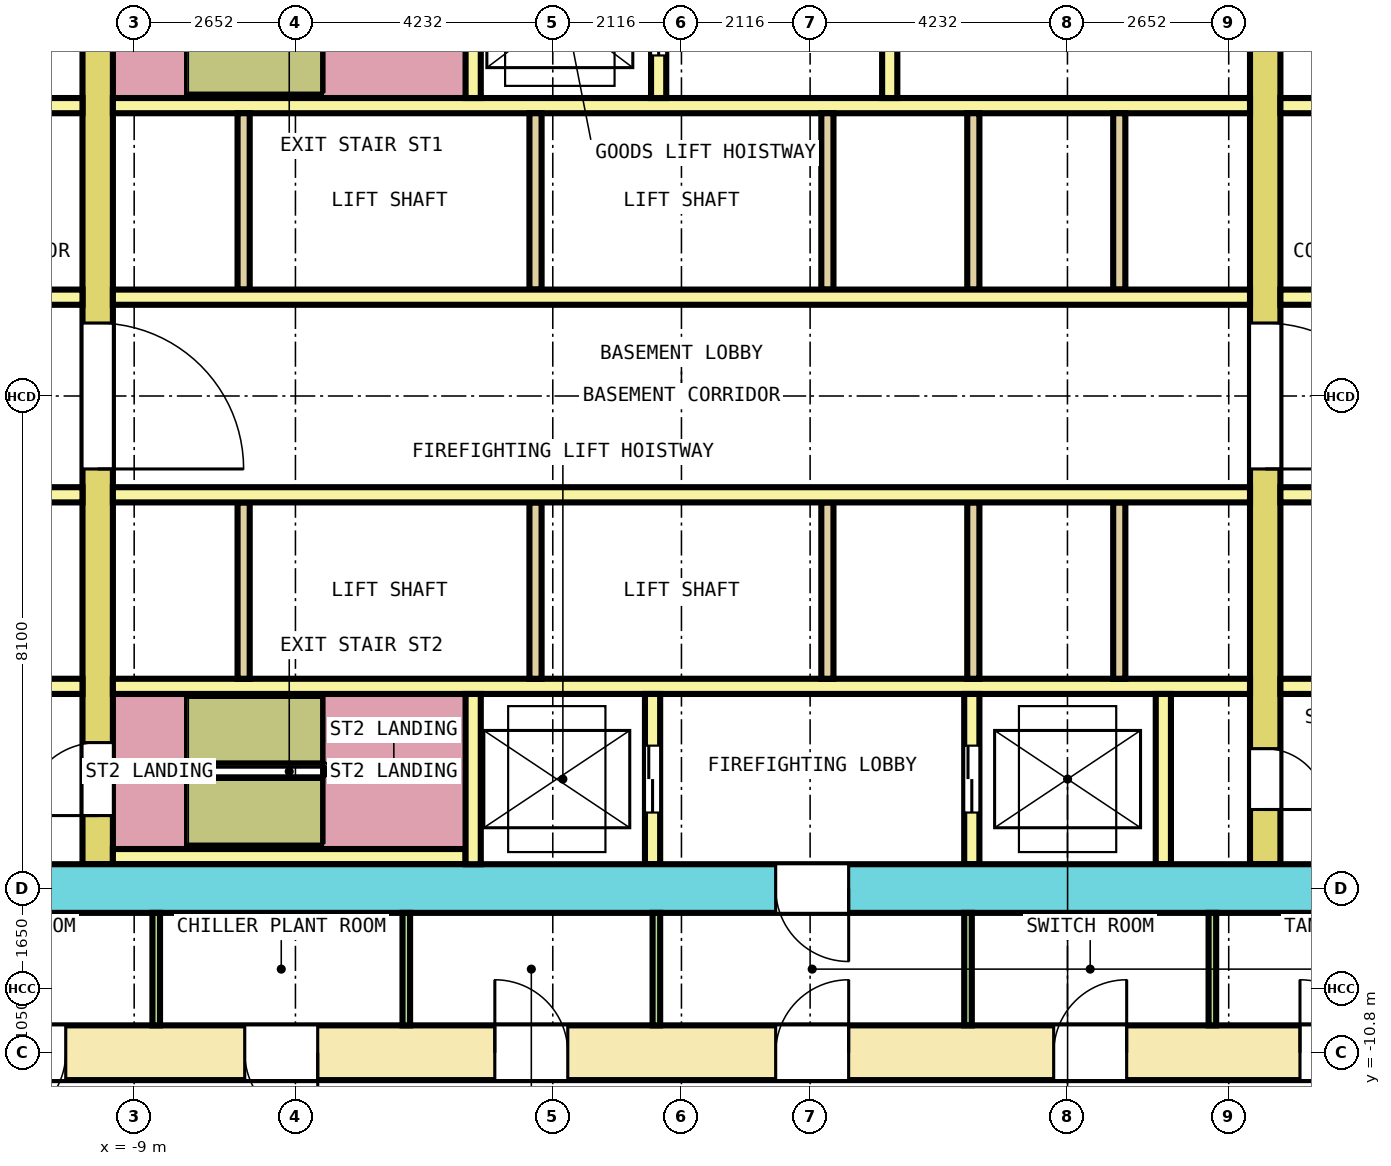
"""IFC4 building model, lengths in metres.
Left out: names, types, materials, properties, quantities, classifications, styles, units other than length and angle.
Written with IfcOpenShell. Run it as: python <this file> out.ifc"""

import sys

from ifc_helpers import new_model, si_unit, direction, frame, frame_2d, origin, place, context, subcontext, project, spatial, rectangle, extrude, element, fill, save


model = new_model("IFC4")
c1 = context("Model", 3, precision=1e-05, world=origin(), true_north=direction((0.0, 1.0)))
c2 = subcontext(c1, "Body", "Model", "MODEL_VIEW")
j1 = project(units=[si_unit("LENGTHUNIT", "METRE"), si_unit("PLANEANGLEUNIT", "RADIAN")], contexts=[c1])
p1 = place(None, origin())
s1 = spatial("IfcSite", under=j1, at=p1, CompositionType="ELEMENT")
p2 = place(p1, origin())
s2 = spatial("IfcBuilding", under=s1, at=p2, CompositionType="ELEMENT")
p3 = place(p2, frame((0.0, 0.0, -5.2)))
s3 = spatial("IfcBuildingStorey", under=s2, at=p3, CompositionType="ELEMENT", Elevation=-5.2)
p4 = place(p3, frame((-13.65, -10.8, 0.0), z_axis=(0.0, 0.0, 1.0), x_axis=(1.0, 0.0, 0.0)))
e1 = element("IfcWall", 1, at=p4, inside=s3, PredefinedType="SHEAR", context=c2, shape_type="SweptSolid", body=[
    extrude(rectangle(XDim=27.3, YDim=0.9, at=frame_2d((13.65, 0.0))), origin(), (0.0, 0.0, 1.0), 4.9),
])
p5 = place(p4, frame((2.325, 0.0, 0.0)))
e2 = element("IfcOpeningElement", 2, at=p5, cuts=e1, PredefinedType="OPENING", context=c2, shape_type="SweptSolid", body=[
    extrude(rectangle(XDim=1.2, YDim=2.1, at=frame_2d((0.6, 1.05))), frame((0.0, 0.46, 0.0), z_axis=(0.0, -1.0, 0.0), x_axis=(1.0, 0.0, 0.0)), (0.0, 0.0, 1.0), 0.92),
])
p6 = place(p4, frame((6.469, 0.0, 0.0)))
e3 = element("IfcOpeningElement", 3, at=p6, cuts=e1, PredefinedType="OPENING", context=c2, shape_type="SweptSolid", body=[
    extrude(rectangle(XDim=1.2, YDim=2.1, at=frame_2d((0.6, 1.05))), frame((0.0, 0.46, 0.0), z_axis=(0.0, -1.0, 0.0), x_axis=(1.0, 0.0, 0.0)), (0.0, 0.0, 1.0), 0.92),
])
p7 = place(p4, frame((10.581, 0.0, 0.0)))
e4 = element("IfcOpeningElement", 4, at=p7, cuts=e1, PredefinedType="OPENING", context=c2, shape_type="SweptSolid", body=[
    extrude(rectangle(XDim=1.2, YDim=2.1, at=frame_2d((0.6, 1.05))), frame((0.0, 0.46, 0.0), z_axis=(0.0, -1.0, 0.0), x_axis=(1.0, 0.0, 0.0)), (0.0, 0.0, 1.0), 0.92),
])
p8 = place(p4, frame((19.772, 0.0, 0.0)))
e5 = element("IfcOpeningElement", 5, at=p8, cuts=e1, PredefinedType="OPENING", context=c2, shape_type="SweptSolid", body=[
    extrude(rectangle(XDim=1.2, YDim=2.1, at=frame_2d((0.6, 1.05))), frame((0.0, 0.46, 0.0), z_axis=(0.0, -1.0, 0.0), x_axis=(1.0, 0.0, 0.0)), (0.0, 0.0, 1.0), 0.92),
])
p9 = place(p4, frame((23.822, 0.0, 0.0)))
e6 = element("IfcOpeningElement", 6, at=p9, cuts=e1, PredefinedType="OPENING", context=c2, shape_type="SweptSolid", body=[
    extrude(rectangle(XDim=1.2, YDim=2.1, at=frame_2d((0.6, 1.05))), frame((0.0, 0.46, 0.0), z_axis=(0.0, -1.0, 0.0), x_axis=(1.0, 0.0, 0.0)), (0.0, 0.0, 1.0), 0.92),
])
p10 = place(p4, frame((15.2, 0.0, 0.0)))
e7 = element("IfcOpeningElement", 7, at=p10, cuts=e1, PredefinedType="OPENING", context=c2, shape_type="SweptSolid", body=[
    extrude(rectangle(XDim=1.2, YDim=2.1, at=frame_2d((0.6, 1.05))), frame((0.0, 0.46, 0.0), z_axis=(0.0, -1.0, 0.0), x_axis=(1.0, 0.0, 0.0)), (0.0, 0.0, 1.0), 0.92),
])
p11 = place(p3, frame((-12.75, -8.1, 0.0), z_axis=(0.0, 0.0, 1.0), x_axis=(1.0, 0.0, 0.0)))
e8 = element("IfcWall", 8, at=p11, inside=s3, PredefinedType="SHEAR", context=c2, shape_type="SweptSolid", body=[
    extrude(rectangle(XDim=25.5, YDim=0.8, at=frame_2d((12.75, 0.0))), origin(), (0.0, 0.0, 1.0), 4.9),
])
p12 = place(p11, frame((14.3, 0.0, 0.0)))
e9 = element("IfcOpeningElement", 9, at=p12, cuts=e8, PredefinedType="OPENING", context=c2, shape_type="SweptSolid", body=[
    extrude(rectangle(XDim=1.2, YDim=2.1, at=frame_2d((0.6, 1.05))), frame((0.0, 0.41, 0.0), z_axis=(0.0, -1.0, 0.0), x_axis=(1.0, 0.0, 0.0)), (0.0, 0.0, 1.0), 0.82),
])
p13 = place(p3, frame((-9.6, -7.7, 0.0), z_axis=(0.0, 0.0, 1.0), x_axis=(0.0, 1.0, 0.0)))
e10 = element("IfcWall", 10, at=p13, inside=s3, PredefinedType="SHEAR", context=c2, shape_type="SweptSolid", body=[
    extrude(rectangle(XDim=15.4, YDim=0.5, at=frame_2d((7.7, 0.0))), origin(), (0.0, 0.0, 1.0), 4.9),
])
p14 = place(p13, frame((6.5, 0.0, 0.0)))
e11 = element("IfcOpeningElement", 11, at=p14, cuts=e10, PredefinedType="OPENING", context=c2, shape_type="SweptSolid", body=[
    extrude(rectangle(XDim=2.4, YDim=2.1, at=frame_2d((1.2, 1.05))), frame((0.0, 0.26, 0.0), z_axis=(0.0, -1.0, 0.0), x_axis=(1.0, 0.0, 0.0)), (0.0, 0.0, 1.0), 0.52),
])
p15 = place(p13, frame((13.4, 0.0, 0.0)))
e12 = element("IfcOpeningElement", 12, at=p15, cuts=e10, PredefinedType="OPENING", context=c2, shape_type="SweptSolid", body=[
    extrude(rectangle(XDim=1.2, YDim=2.1, at=frame_2d((0.6, 1.05))), frame((0.0, 0.26, 0.0), z_axis=(0.0, -1.0, 0.0), x_axis=(1.0, 0.0, 0.0)), (0.0, 0.0, 1.0), 0.52),
])
p16 = place(p13, frame((0.8, 0.0, 0.0)))
e13 = element("IfcOpeningElement", 13, at=p16, cuts=e10, PredefinedType="OPENING", context=c2, shape_type="SweptSolid", body=[
    extrude(rectangle(XDim=1.2, YDim=2.1, at=frame_2d((0.6, 1.05))), frame((0.0, 0.26, 0.0), z_axis=(0.0, -1.0, 0.0), x_axis=(1.0, 0.0, 0.0)), (0.0, 0.0, 1.0), 0.52),
])
p17 = place(p3, frame((9.6, -7.7, 0.0), z_axis=(0.0, 0.0, 1.0), x_axis=(0.0, 1.0, 0.0)))
e14 = element("IfcWall", 14, at=p17, inside=s3, PredefinedType="SHEAR", context=c2, shape_type="SweptSolid", body=[
    extrude(rectangle(XDim=15.4, YDim=0.5, at=frame_2d((7.7, 0.0))), origin(), (0.0, 0.0, 1.0), 4.9),
])
p18 = place(p17, frame((6.5, 0.0, 0.0)))
e15 = element("IfcOpeningElement", 15, at=p18, cuts=e14, PredefinedType="OPENING", context=c2, shape_type="SweptSolid", body=[
    extrude(rectangle(XDim=2.4, YDim=2.1, at=frame_2d((1.2, 1.05))), frame((0.0, 0.26, 0.0), z_axis=(0.0, -1.0, 0.0), x_axis=(1.0, 0.0, 0.0)), (0.0, 0.0, 1.0), 0.52),
])
p19 = place(p17, frame((0.9, 0.0, 0.0)))
e16 = element("IfcOpeningElement", 16, at=p19, cuts=e14, PredefinedType="OPENING", context=c2, shape_type="SweptSolid", body=[
    extrude(rectangle(XDim=1.0, YDim=2.1, at=frame_2d((0.5, 1.05))), frame((0.0, 0.26, 0.0), z_axis=(0.0, -1.0, 0.0), x_axis=(1.0, 0.0, 0.0)), (0.0, 0.0, 1.0), 0.52),
])
p20 = place(p3, frame((-12.75, 1.625, 0.0), z_axis=(0.0, 0.0, 1.0), x_axis=(1.0, 0.0, 0.0)))
e17 = element("IfcWall", 17, at=p20, inside=s3, PredefinedType="SOLIDWALL", context=c2, shape_type="SweptSolid", body=[
    extrude(rectangle(XDim=2.9, YDim=0.25, at=frame_2d((1.45, 0.0))), origin(), (0.0, 0.0, 1.0), 4.9),
])
p21 = place(p3, frame((-9.35, 1.625, 0.0), z_axis=(0.0, 0.0, 1.0), x_axis=(1.0, 0.0, 0.0)))
e18 = element("IfcWall", 18, at=p21, inside=s3, PredefinedType="SOLIDWALL", context=c2, shape_type="SweptSolid", body=[
    extrude(rectangle(XDim=18.7, YDim=0.25, at=frame_2d((9.35, 0.0))), origin(), (0.0, 0.0, 1.0), 4.9),
])
for number, where, z_axis, x_axis in (
    (19, (9.85, 1.625, 0.0), (0.0, 0.0, 1.0), (1.0, 0.0, 0.0)),
    (20, (-12.75, 4.775, 0.0), (0.0, 0.0, 1.0), (1.0, 0.0, 0.0)),
):
    element("IfcWall", number, at=place(p3, frame(where, z_axis=z_axis, x_axis=x_axis)), inside=s3, PredefinedType="SOLIDWALL", context=c2, shape_type="SweptSolid", body=[
        extrude(rectangle(XDim=2.9, YDim=0.25, at=frame_2d((1.45, 0.0))), origin(), (0.0, 0.0, 1.0), 4.9),
    ])
p22 = place(p3, frame((-9.35, 4.775, 0.0), z_axis=(0.0, 0.0, 1.0), x_axis=(1.0, 0.0, 0.0)))
e21 = element("IfcWall", 21, at=p22, inside=s3, PredefinedType="SOLIDWALL", context=c2, shape_type="SweptSolid", body=[
    extrude(rectangle(XDim=18.7, YDim=0.25, at=frame_2d((9.35, 0.0))), origin(), (0.0, 0.0, 1.0), 4.9),
])
p23 = place(p3, frame((9.85, 4.775, 0.0), z_axis=(0.0, 0.0, 1.0), x_axis=(1.0, 0.0, 0.0)))
e22 = element("IfcWall", 22, at=p23, inside=s3, PredefinedType="SOLIDWALL", context=c2, shape_type="SweptSolid", body=[
    extrude(rectangle(XDim=2.9, YDim=0.25, at=frame_2d((1.45, 0.0))), origin(), (0.0, 0.0, 1.0), 4.9),
])
for number, where, z_axis, x_axis in (
    (23, (-7.2, 1.75, 0.0), (0.0, 0.0, 1.0), (0.0, 1.0, 0.0)),
    (24, (-2.4, 1.75, 0.0), (0.0, 0.0, 1.0), (0.0, 1.0, 0.0)),
    (25, (2.4, 1.75, 0.0), (0.0, 0.0, 1.0), (0.0, 1.0, 0.0)),
    (26, (4.8, 1.75, 0.0), (0.0, 0.0, 1.0), (0.0, 1.0, 0.0)),
    (27, (7.2, 1.75, 0.0), (0.0, 0.0, 1.0), (0.0, 1.0, 0.0)),
):
    element("IfcWall", number, at=place(p3, frame(where, z_axis=z_axis, x_axis=x_axis)), inside=s3, PredefinedType="SOLIDWALL", context=c2, shape_type="SweptSolid", body=[
        extrude(rectangle(XDim=2.9, YDim=0.2, at=frame_2d((1.45, 0.0))), origin(), (0.0, 0.0, 1.0), 4.9),
    ])
p24 = place(p3, frame((-12.75, -1.625, 0.0), z_axis=(0.0, 0.0, 1.0), x_axis=(1.0, 0.0, 0.0)))
e28 = element("IfcWall", 28, at=p24, inside=s3, PredefinedType="SOLIDWALL", context=c2, shape_type="SweptSolid", body=[
    extrude(rectangle(XDim=2.9, YDim=0.25, at=frame_2d((1.45, 0.0))), origin(), (0.0, 0.0, 1.0), 4.9),
])
p25 = place(p3, frame((-9.35, -1.625, 0.0), z_axis=(0.0, 0.0, 1.0), x_axis=(1.0, 0.0, 0.0)))
e29 = element("IfcWall", 29, at=p25, inside=s3, PredefinedType="SOLIDWALL", context=c2, shape_type="SweptSolid", body=[
    extrude(rectangle(XDim=18.7, YDim=0.25, at=frame_2d((9.35, 0.0))), origin(), (0.0, 0.0, 1.0), 4.9),
])
for number, where, z_axis, x_axis in (
    (30, (9.85, -1.625, 0.0), (0.0, 0.0, 1.0), (1.0, 0.0, 0.0)),
    (31, (-12.75, -4.775, 0.0), (0.0, 0.0, 1.0), (1.0, 0.0, 0.0)),
):
    element("IfcWall", number, at=place(p3, frame(where, z_axis=z_axis, x_axis=x_axis)), inside=s3, PredefinedType="SOLIDWALL", context=c2, shape_type="SweptSolid", body=[
        extrude(rectangle(XDim=2.9, YDim=0.25, at=frame_2d((1.45, 0.0))), origin(), (0.0, 0.0, 1.0), 4.9),
    ])
p26 = place(p3, frame((-9.35, -4.775, 0.0), z_axis=(0.0, 0.0, 1.0), x_axis=(1.0, 0.0, 0.0)))
e32 = element("IfcWall", 32, at=p26, inside=s3, PredefinedType="SOLIDWALL", context=c2, shape_type="SweptSolid", body=[
    extrude(rectangle(XDim=18.7, YDim=0.25, at=frame_2d((9.35, 0.0))), origin(), (0.0, 0.0, 1.0), 4.9),
])
p27 = place(p3, frame((9.85, -4.775, 0.0), z_axis=(0.0, 0.0, 1.0), x_axis=(1.0, 0.0, 0.0)))
e33 = element("IfcWall", 33, at=p27, inside=s3, PredefinedType="SOLIDWALL", context=c2, shape_type="SweptSolid", body=[
    extrude(rectangle(XDim=2.9, YDim=0.25, at=frame_2d((1.45, 0.0))), origin(), (0.0, 0.0, 1.0), 4.9),
])
for number, where, z_axis, x_axis in (
    (34, (-7.2, -4.65, 0.0), (0.0, 0.0, 1.0), (0.0, 1.0, 0.0)),
    (35, (-2.4, -4.65, 0.0), (0.0, 0.0, 1.0), (0.0, 1.0, 0.0)),
    (36, (2.4, -4.65, 0.0), (0.0, 0.0, 1.0), (0.0, 1.0, 0.0)),
    (37, (4.8, -4.65, 0.0), (0.0, 0.0, 1.0), (0.0, 1.0, 0.0)),
    (38, (7.2, -4.65, 0.0), (0.0, 0.0, 1.0), (0.0, 1.0, 0.0)),
):
    element("IfcWall", number, at=place(p3, frame(where, z_axis=z_axis, x_axis=x_axis)), inside=s3, PredefinedType="SOLIDWALL", context=c2, shape_type="SweptSolid", body=[
        extrude(rectangle(XDim=2.9, YDim=0.2, at=frame_2d((1.45, 0.0))), origin(), (0.0, 0.0, 1.0), 4.9),
    ])
p28 = place(p3, frame((-3.425, 4.9, 0.0), z_axis=(0.0, 0.0, 1.0), x_axis=(0.0, 1.0, 0.0)))
e39 = element("IfcWall", 39, at=p28, inside=s3, PredefinedType="SOLIDWALL", context=c2, shape_type="SweptSolid", body=[
    extrude(rectangle(XDim=2.8, YDim=0.25, at=frame_2d((1.4, 0.0))), origin(), (0.0, 0.0, 1.0), 4.9),
])
p29 = place(p3, frame((-0.375, 4.9, 0.0), z_axis=(0.0, 0.0, 1.0), x_axis=(0.0, 1.0, 0.0)))
e40 = element("IfcWall", 40, at=p29, inside=s3, PredefinedType="SOLIDWALL", context=c2, shape_type="SweptSolid", body=[
    extrude(rectangle(XDim=2.8, YDim=0.25, at=frame_2d((1.4, 0.0))), origin(), (0.0, 0.0, 1.0), 4.9),
])
p30 = place(p29, frame((0.7, 0.0, 0.0)))
e41 = element("IfcOpeningElement", 41, at=p30, cuts=e40, PredefinedType="OPENING", context=c2, shape_type="SweptSolid", body=[
    extrude(rectangle(XDim=1.4, YDim=2.1, at=frame_2d((0.7, 1.05))), frame((0.0, 0.135, 0.0), z_axis=(0.0, -1.0, 0.0), x_axis=(1.0, 0.0, 0.0)), (0.0, 0.0, 1.0), 0.27),
])
p31 = place(p3, frame((3.425, 4.9, 0.0), z_axis=(0.0, 0.0, 1.0), x_axis=(0.0, 1.0, 0.0)))
e42 = element("IfcWall", 42, at=p31, inside=s3, PredefinedType="SOLIDWALL", context=c2, shape_type="SweptSolid", body=[
    extrude(rectangle(XDim=2.8, YDim=0.25, at=frame_2d((1.4, 0.0))), origin(), (0.0, 0.0, 1.0), 4.9),
])
p32 = place(p3, frame((-9.35, -7.575, 0.0), z_axis=(0.0, 0.0, 1.0), x_axis=(1.0, 0.0, 0.0)))
e43 = element("IfcWall", 43, at=p32, inside=s3, PredefinedType="SOLIDWALL", context=c2, shape_type="SweptSolid", body=[
    extrude(rectangle(XDim=5.8, YDim=0.25, at=frame_2d((2.9, 0.0))), origin(), (0.0, 0.0, 1.0), 4.9),
])
p33 = place(p3, frame((-3.425, -7.7, 0.0), z_axis=(0.0, 0.0, 1.0), x_axis=(0.0, 1.0, 0.0)))
e44 = element("IfcWall", 44, at=p33, inside=s3, PredefinedType="SOLIDWALL", context=c2, shape_type="SweptSolid", body=[
    extrude(rectangle(XDim=2.8, YDim=0.25, at=frame_2d((1.4, 0.0))), origin(), (0.0, 0.0, 1.0), 4.9),
])
p34 = place(p3, frame((-0.475, -7.7, 0.0), z_axis=(0.0, 0.0, 1.0), x_axis=(0.0, 1.0, 0.0)))
e45 = element("IfcWall", 45, at=p34, inside=s3, PredefinedType="SOLIDWALL", context=c2, shape_type="SweptSolid", body=[
    extrude(rectangle(XDim=2.8, YDim=0.25, at=frame_2d((1.4, 0.0))), origin(), (0.0, 0.0, 1.0), 4.9),
])
p35 = place(p34, frame((0.85, 0.0, 0.0)))
e46 = element("IfcOpeningElement", 46, at=p35, cuts=e45, PredefinedType="OPENING", context=c2, shape_type="SweptSolid", body=[
    extrude(rectangle(XDim=1.1, YDim=2.1, at=frame_2d((0.55, 1.05))), frame((0.0, 0.135, 0.0), z_axis=(0.0, -1.0, 0.0), x_axis=(1.0, 0.0, 0.0)), (0.0, 0.0, 1.0), 0.27),
])
p36 = place(p3, frame((4.775, -7.7, 0.0), z_axis=(0.0, 0.0, 1.0), x_axis=(0.0, 1.0, 0.0)))
e47 = element("IfcWall", 47, at=p36, inside=s3, PredefinedType="SOLIDWALL", context=c2, shape_type="SweptSolid", body=[
    extrude(rectangle(XDim=2.8, YDim=0.25, at=frame_2d((1.4, 0.0))), origin(), (0.0, 0.0, 1.0), 4.9),
])
p37 = place(p36, frame((0.85, 0.0, 0.0)))
e48 = element("IfcOpeningElement", 48, at=p37, cuts=e47, PredefinedType="OPENING", context=c2, shape_type="SweptSolid", body=[
    extrude(rectangle(XDim=1.1, YDim=2.1, at=frame_2d((0.55, 1.05))), frame((0.0, 0.135, 0.0), z_axis=(0.0, -1.0, 0.0), x_axis=(1.0, 0.0, 0.0)), (0.0, 0.0, 1.0), 0.27),
])
p38 = place(p3, frame((7.925, -7.7, 0.0), z_axis=(0.0, 0.0, 1.0), x_axis=(0.0, 1.0, 0.0)))
e49 = element("IfcWall", 49, at=p38, inside=s3, PredefinedType="SOLIDWALL", context=c2, shape_type="SweptSolid", body=[
    extrude(rectangle(XDim=2.8, YDim=0.25, at=frame_2d((1.4, 0.0))), origin(), (0.0, 0.0, 1.0), 4.9),
])
for number, where, z_axis, x_axis in (
    (50, (-8.637, -10.35, 0.0), (0.0, 0.0, 1.0), (0.0, 1.0, 0.0)),
    (51, (-4.525, -10.35, 0.0), (0.0, 0.0, 1.0), (0.0, 1.0, 0.0)),
    (52, (-0.413, -10.35, 0.0), (0.0, 0.0, 1.0), (0.0, 1.0, 0.0)),
    (53, (4.712, -10.35, 0.0), (0.0, 0.0, 1.0), (0.0, 1.0, 0.0)),
    (54, (8.731, -10.35, 0.0), (0.0, 0.0, 1.0), (0.0, 1.0, 0.0)),
):
    element("IfcWall", number, at=place(p3, frame(where, z_axis=z_axis, x_axis=x_axis)), inside=s3, PredefinedType="PARTITIONING", context=c2, shape_type="SweptSolid", body=[
        extrude(rectangle(XDim=1.85, YDim=0.125, at=frame_2d((0.925, 0.0))), origin(), (0.0, 0.0, 1.0), 4.9),
    ])
p39 = place(p35, origin())
e55 = element("IfcDoor", 55, at=p39, inside=s3, OperationType="DOUBLE_DOOR_SLIDING", PredefinedType="DOOR", context=c2, shape_type="SweptSolid", body=[
    extrude(rectangle(XDim=1.1, YDim=2.1, at=frame_2d((0.55, 1.05))), frame((0.0, 0.075, 0.0), z_axis=(0.0, -1.0, 0.0), x_axis=(1.0, 0.0, 0.0)), (0.0, 0.0, 1.0), 0.15),
])
fill(e46, e55)
p40 = place(p37, origin())
e56 = element("IfcDoor", 56, at=p40, inside=s3, OperationType="DOUBLE_DOOR_SLIDING", PredefinedType="DOOR", context=c2, shape_type="SweptSolid", body=[
    extrude(rectangle(XDim=1.1, YDim=2.1, at=frame_2d((0.55, 1.05))), frame((0.0, 0.075, 0.0), z_axis=(0.0, -1.0, 0.0), x_axis=(1.0, 0.0, 0.0)), (0.0, 0.0, 1.0), 0.15),
])
fill(e48, e56)
p41 = place(p30, origin())
e57 = element("IfcDoor", 57, at=p41, inside=s3, OperationType="DOUBLE_DOOR_SLIDING", PredefinedType="DOOR", context=c2, shape_type="SweptSolid", body=[
    extrude(rectangle(XDim=1.4, YDim=2.1, at=frame_2d((0.7, 1.05))), frame((0.0, 0.075, 0.0), z_axis=(0.0, -1.0, 0.0), x_axis=(1.0, 0.0, 0.0)), (0.0, 0.0, 1.0), 0.15),
])
fill(e41, e57)
p42 = place(p14, origin())
e58 = element("IfcDoor", 58, at=p42, inside=s3, OperationType="DOUBLE_DOOR_SINGLE_SWING", PredefinedType="DOOR", context=c2, shape_type="SweptSolid", body=[
    extrude(rectangle(XDim=2.4, YDim=2.1, at=frame_2d((1.2, 1.05))), frame((0.0, 0.2, 0.0), z_axis=(0.0, -1.0, 0.0), x_axis=(1.0, 0.0, 0.0)), (0.0, 0.0, 1.0), 0.4),
])
fill(e11, e58)
p43 = place(p18, origin())
e59 = element("IfcDoor", 59, at=p43, inside=s3, OperationType="DOUBLE_DOOR_SINGLE_SWING", PredefinedType="DOOR", context=c2, shape_type="SweptSolid", body=[
    extrude(rectangle(XDim=2.4, YDim=2.1, at=frame_2d((1.2, 1.05))), frame((0.0, 0.2, 0.0), z_axis=(0.0, -1.0, 0.0), x_axis=(1.0, 0.0, 0.0)), (0.0, 0.0, 1.0), 0.4),
])
fill(e15, e59)
p44 = place(p16, origin())
e60 = element("IfcDoor", 60, at=p44, inside=s3, OperationType="SINGLE_SWING_RIGHT", PredefinedType="DOOR", context=c2, shape_type="SweptSolid", body=[
    extrude(rectangle(XDim=1.2, YDim=2.1, at=frame_2d((0.6, 1.05))), frame((0.0, 0.2, 0.0), z_axis=(0.0, -1.0, 0.0), x_axis=(1.0, 0.0, 0.0)), (0.0, 0.0, 1.0), 0.4),
])
fill(e13, e60)
p45 = place(p12, origin())
e61 = element("IfcDoor", 61, at=p45, inside=s3, OperationType="SINGLE_SWING_RIGHT", PredefinedType="DOOR", context=c2, shape_type="SweptSolid", body=[
    extrude(rectangle(XDim=1.2, YDim=2.1, at=frame_2d((0.6, 1.05))), frame((0.0, 0.3, 0.0), z_axis=(0.0, -1.0, 0.0), x_axis=(1.0, 0.0, 0.0)), (0.0, 0.0, 1.0), 0.6),
])
fill(e9, e61)
p46 = place(p19, origin())
e62 = element("IfcDoor", 62, at=p46, inside=s3, OperationType="SINGLE_SWING_RIGHT", PredefinedType="DOOR", context=c2, shape_type="SweptSolid", body=[
    extrude(rectangle(XDim=1.0, YDim=2.1, at=frame_2d((0.5, 1.05))), frame((0.0, 0.2, 0.0), z_axis=(0.0, -1.0, 0.0), x_axis=(1.0, 0.0, 0.0)), (0.0, 0.0, 1.0), 0.4),
])
fill(e16, e62)
p47 = place(p5, origin())
e63 = element("IfcDoor", 63, at=p47, inside=s3, OperationType="SINGLE_SWING_LEFT", PredefinedType="DOOR", context=c2, shape_type="SweptSolid", body=[
    extrude(rectangle(XDim=1.2, YDim=2.1, at=frame_2d((0.6, 1.05))), frame((0.0, 0.3, 0.0), z_axis=(0.0, -1.0, 0.0), x_axis=(1.0, 0.0, 0.0)), (0.0, 0.0, 1.0), 0.6),
])
fill(e2, e63)
p48 = place(p6, origin())
e64 = element("IfcDoor", 64, at=p48, inside=s3, OperationType="SINGLE_SWING_RIGHT", PredefinedType="DOOR", context=c2, shape_type="SweptSolid", body=[
    extrude(rectangle(XDim=1.2, YDim=2.1, at=frame_2d((0.6, 1.05))), frame((0.0, 0.3, 0.0), z_axis=(0.0, -1.0, 0.0), x_axis=(1.0, 0.0, 0.0)), (0.0, 0.0, 1.0), 0.6),
])
fill(e3, e64)
p49 = place(p7, origin())
e65 = element("IfcDoor", 65, at=p49, inside=s3, OperationType="SINGLE_SWING_LEFT", PredefinedType="DOOR", context=c2, shape_type="SweptSolid", body=[
    extrude(rectangle(XDim=1.2, YDim=2.1, at=frame_2d((0.6, 1.05))), frame((0.0, 0.3, 0.0), z_axis=(0.0, -1.0, 0.0), x_axis=(1.0, 0.0, 0.0)), (0.0, 0.0, 1.0), 0.6),
])
fill(e4, e65)
p50 = place(p8, origin())
e66 = element("IfcDoor", 66, at=p50, inside=s3, OperationType="SINGLE_SWING_RIGHT", PredefinedType="DOOR", context=c2, shape_type="SweptSolid", body=[
    extrude(rectangle(XDim=1.2, YDim=2.1, at=frame_2d((0.6, 1.05))), frame((0.0, 0.3, 0.0), z_axis=(0.0, -1.0, 0.0), x_axis=(1.0, 0.0, 0.0)), (0.0, 0.0, 1.0), 0.6),
])
fill(e5, e66)
p51 = place(p9, origin())
e67 = element("IfcDoor", 67, at=p51, inside=s3, OperationType="SINGLE_SWING_LEFT", PredefinedType="DOOR", context=c2, shape_type="SweptSolid", body=[
    extrude(rectangle(XDim=1.2, YDim=2.1, at=frame_2d((0.6, 1.05))), frame((0.0, 0.3, 0.0), z_axis=(0.0, -1.0, 0.0), x_axis=(1.0, 0.0, 0.0)), (0.0, 0.0, 1.0), 0.6),
])
fill(e6, e67)
p52 = place(p10, origin())
e68 = element("IfcDoor", 68, at=p52, inside=s3, OperationType="SINGLE_SWING_RIGHT", PredefinedType="DOOR", context=c2, shape_type="SweptSolid", body=[
    extrude(rectangle(XDim=1.2, YDim=2.1, at=frame_2d((0.6, 1.05))), frame((0.0, 0.3, 0.0), z_axis=(0.0, -1.0, 0.0), x_axis=(1.0, 0.0, 0.0)), (0.0, 0.0, 1.0), 0.6),
])
fill(e7, e68)
save(model, sys.argv[1])
